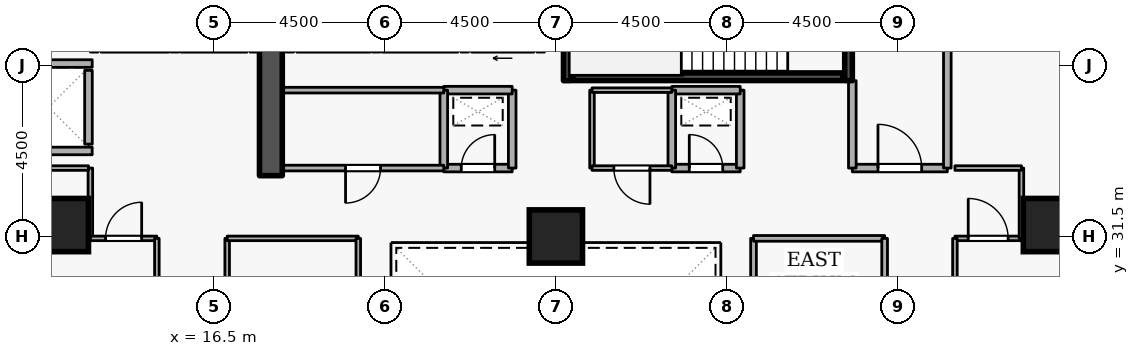
"""IFC4 building model, lengths in metres.
Left out: names, types, materials, properties, quantities, classifications, styles, units other than length and angle.
Written with IfcOpenShell. Run it as: python <this file> out.ifc"""

import sys

from ifc_helpers import new_model, si_unit, direction, frame, frame_2d, origin, origin_2d, place, context, subcontext, project, spatial, rectangle, extrude, element, fill, save


model = new_model("IFC4")
c1 = context("Model", 3, precision=1e-05, world=origin(), true_north=direction((0.0, 1.0)))
c2 = subcontext(c1, "Body", "Model", "MODEL_VIEW")
j1 = project(units=[si_unit("LENGTHUNIT", "METRE"), si_unit("PLANEANGLEUNIT", "RADIAN")], contexts=[c1])
p1 = place(None, origin())
s1 = spatial("IfcSite", under=j1, at=p1, CompositionType="ELEMENT")
p2 = place(p1, origin())
s2 = spatial("IfcBuilding", under=s1, at=p2, CompositionType="ELEMENT")
p3 = place(p2, frame((0.0, 0.0, 60.9)))
s3 = spatial("IfcBuildingStorey", under=s2, at=p3, CompositionType="ELEMENT", Elevation=60.9)
p4 = place(p3, frame((18.0, 33.1, 0.0), z_axis=(0.0, 0.0, 1.0), x_axis=(0.0, 1.0, 0.0)))
e1 = element("IfcWall", 1, at=p4, inside=s3, PredefinedType="SHEAR", context=c2, shape_type="SweptSolid", body=[
    extrude(rectangle(XDim=5.7, YDim=0.6, at=frame_2d((2.85, 0.0))), origin(), (0.0, 0.0, 1.0), 3.6),
])
for number, where, z_axis, x_axis in (
    (2, (12.5, 31.8, 0.0), (0.0, 0.0, 1.0), (1.0, 0.0, 0.0)),
    (3, (38.5, 31.8, 0.0), (0.0, 0.0, 1.0), (1.0, 0.0, 0.0)),
    (4, (25.5, 31.5, 0.0), (0.0, 0.0, 1.0), (1.0, 0.0, 0.0)),
):
    element("IfcColumn", number, at=place(p3, frame(where, z_axis=z_axis, x_axis=x_axis)), inside=s3, PredefinedType="COLUMN", context=c2, shape_type="SweptSolid", body=[
        extrude(rectangle(XDim=1.4, YDim=1.4, at=origin_2d()), origin(), (0.0, 0.0, 1.0), 3.6),
    ])
p5 = place(p3, frame((24.92, 36.45, 0.0), z_axis=(0.0, 0.0, 1.0), x_axis=(-1.0, 0.0, 0.0)))
e5 = element("IfcWall", 5, at=p5, inside=s3, PredefinedType="STANDARD", context=c2, shape_type="SweptSolid", body=[
    extrude(rectangle(XDim=1.64, YDim=0.2, at=frame_2d((0.82, 0.0))), origin(), (0.0, 0.0, 1.0), 3.34),
])
p6 = place(p5, frame((0.31, 0.0, 0.0)))
e6 = element("IfcOpeningElement", 6, at=p6, cuts=e5, PredefinedType="OPENING", context=c2, shape_type="SweptSolid", body=[
    extrude(rectangle(XDim=1.02, YDim=2.06, at=frame_2d((0.51, 1.03))), frame((0.0, 0.11, 0.0), z_axis=(0.0, -1.0, 0.0), x_axis=(1.0, 0.0, 0.0)), (0.0, 0.0, 1.0), 0.22),
])
p7 = place(p3, frame((22.92, 36.45, 0.0), z_axis=(0.0, 0.0, 1.0), x_axis=(-1.0, 0.0, 0.0)))
e7 = element("IfcWall", 7, at=p7, inside=s3, PredefinedType="STANDARD", context=c2, shape_type="SweptSolid", body=[
    extrude(rectangle(XDim=1.99, YDim=0.2, at=frame_2d((0.995, 0.0))), origin(), (0.0, 0.0, 1.0), 3.34),
])
p8 = place(p3, frame((20.62, 36.45, 0.0), z_axis=(0.0, 0.0, 1.0), x_axis=(-1.0, 0.0, 0.0)))
e8 = element("IfcWall", 8, at=p8, inside=s3, PredefinedType="STANDARD", context=c2, shape_type="SweptSolid", body=[
    extrude(rectangle(XDim=1.94, YDim=0.2, at=frame_2d((0.97, 0.0))), origin(), (0.0, 0.0, 1.0), 3.34),
])
p9 = place(p3, frame((17.37, 36.45, 0.0), z_axis=(0.0, 0.0, 1.0), x_axis=(-1.0, 0.0, 0.0)))
e9 = element("IfcWall", 9, at=p9, inside=s3, PredefinedType="STANDARD", context=c2, shape_type="SweptSolid", body=[
    extrude(rectangle(XDim=1.74, YDim=0.2, at=frame_2d((0.87, 0.0))), origin(), (0.0, 0.0, 1.0), 3.34),
])
p10 = place(p3, frame((15.32, 36.45, 0.0), z_axis=(0.0, 0.0, 1.0), x_axis=(-1.0, 0.0, 0.0)))
e10 = element("IfcWall", 10, at=p10, inside=s3, PredefinedType="STANDARD", context=c2, shape_type="SweptSolid", body=[
    extrude(rectangle(XDim=1.79, YDim=0.2, at=frame_2d((0.895, 0.0))), origin(), (0.0, 0.0, 1.0), 3.34),
])
p11 = place(p3, frame((13.2, 33.93, 0.0), z_axis=(0.0, 0.0, 1.0), x_axis=(0.0, 1.0, 0.0)))
e11 = element("IfcWall", 11, at=p11, inside=s3, PredefinedType="STANDARD", context=c2, shape_type="SweptSolid", body=[
    extrude(rectangle(XDim=1.94, YDim=0.2, at=frame_2d((0.97, 0.0))), origin(), (0.0, 0.0, 1.0), 3.34),
])
for number, where, z_axis, x_axis in (
    (12, (11.002, 36.05, 0.0), (0.0, 0.0, 1.0), (1.0, 0.0, 0.0)),
    (13, (11.002, 33.75, 0.0), (0.0, 0.0, 1.0), (1.0, 0.0, 0.0)),
):
    element("IfcWall", number, at=place(p3, frame(where, z_axis=z_axis, x_axis=x_axis)), inside=s3, PredefinedType="STANDARD", context=c2, shape_type="SweptSolid", body=[
        extrude(rectangle(XDim=2.296, YDim=0.2, at=frame_2d((1.148, 0.0))), origin(), (0.0, 0.0, 1.0), 3.34),
    ])
p12 = place(p3, frame((33.2, 38.95, 0.0), z_axis=(0.0, 0.0, 1.0), x_axis=(0.0, -1.0, 0.0)))
e14 = element("IfcWall", 14, at=p12, inside=s3, PredefinedType="SHEAR", context=c2, shape_type="SweptSolid", body=[
    extrude(rectangle(XDim=3.35, YDim=0.2, at=frame_2d((1.675, 0.0))), origin(), (0.0, 0.0, 1.0), 3.6),
])
p13 = place(p12, frame((1.125, 0.0, 0.0)))
e15 = element("IfcOpeningElement", 15, at=p13, cuts=e14, PredefinedType="OPENING", context=c2, shape_type="SweptSolid", body=[
    extrude(rectangle(XDim=1.1, YDim=2.1, at=frame_2d((0.55, 1.05))), frame((0.0, 0.11, 0.0), z_axis=(0.0, -1.0, 0.0), x_axis=(1.0, 0.0, 0.0)), (0.0, 0.0, 1.0), 0.22),
])
p14 = place(p3, frame((25.8, 35.6, 0.0), z_axis=(0.0, 0.0, 1.0), x_axis=(0.0, 1.0, 0.0)))
e16 = element("IfcWall", 16, at=p14, inside=s3, PredefinedType="SHEAR", context=c2, shape_type="SweptSolid", body=[
    extrude(rectangle(XDim=3.35, YDim=0.2, at=frame_2d((1.675, 0.0))), origin(), (0.0, 0.0, 1.0), 3.6),
])
p15 = place(p3, frame((25.95, 35.703, 0.0), z_axis=(0.0, 0.0, 1.0), x_axis=(1.0, 0.0, 0.0)))
e17 = element("IfcWall", 17, at=p15, inside=s3, PredefinedType="SHEAR", context=c2, shape_type="SweptSolid", body=[
    extrude(rectangle(XDim=7.1, YDim=0.2, at=frame_2d((3.55, 0.0))), origin(), (0.0, 0.0, 1.0), 3.6),
])
p16 = place(p3, frame((33.3, 33.3, 0.0), z_axis=(0.0, 0.0, 1.0), x_axis=(1.0, 0.0, 0.0)))
e18 = element("IfcWall", 18, at=p16, inside=s3, PredefinedType="STANDARD", context=c2, shape_type="SweptSolid", body=[
    extrude(rectangle(XDim=2.5, YDim=0.2, at=frame_2d((1.25, 0.0))), origin(), (0.0, 0.0, 1.0), 3.34),
])
p17 = place(p16, frame((0.675, 0.0, 0.0)))
e19 = element("IfcOpeningElement", 19, at=p17, cuts=e18, PredefinedType="OPENING", context=c2, shape_type="SweptSolid", body=[
    extrude(rectangle(XDim=1.15, YDim=2.1, at=frame_2d((0.575, 1.05))), frame((0.0, 0.11, 0.0), z_axis=(0.0, -1.0, 0.0), x_axis=(1.0, 0.0, 0.0)), (0.0, 0.0, 1.0), 0.22),
])
p18 = place(p3, frame((35.8, 33.3, 0.0), z_axis=(0.0, 0.0, 1.0), x_axis=(0.0, 1.0, 0.0)))
e20 = element("IfcWall", 20, at=p18, inside=s3, PredefinedType="STANDARD", context=c2, shape_type="SweptSolid", body=[
    extrude(rectangle(XDim=5.7, YDim=0.2, at=frame_2d((2.85, 0.0))), origin(), (0.0, 0.0, 1.0), 3.34),
])
p19 = place(p3, frame((33.3, 35.6, 0.0), z_axis=(0.0, 0.0, 1.0), x_axis=(0.0, -1.0, 0.0)))
e21 = element("IfcWall", 21, at=p19, inside=s3, PredefinedType="STANDARD", context=c2, shape_type="SweptSolid", body=[
    extrude(rectangle(XDim=2.3, YDim=0.2, at=frame_2d((1.15, 0.0))), origin(), (0.0, 0.0, 1.0), 2.545),
])
p20 = place(p3, frame((22.55, 33.3, 0.0), z_axis=(0.0, 0.0, 1.0), x_axis=(1.0, 0.0, 0.0)))
e22 = element("IfcWall", 22, at=p20, inside=s3, PredefinedType="STANDARD", context=c2, shape_type="SweptSolid", body=[
    extrude(rectangle(XDim=1.8, YDim=0.2, at=frame_2d((0.9, 0.0))), origin(), (0.0, 0.0, 1.0), 3.34),
])
p21 = place(p20, frame((0.46, 0.0, 0.0)))
e23 = element("IfcOpeningElement", 23, at=p21, cuts=e22, PredefinedType="OPENING", context=c2, shape_type="SweptSolid", body=[
    extrude(rectangle(XDim=0.88, YDim=2.04, at=frame_2d((0.44, 1.02))), frame((0.0, 0.11, 0.0), z_axis=(0.0, -1.0, 0.0), x_axis=(1.0, 0.0, 0.0)), (0.0, 0.0, 1.0), 0.22),
])
p22 = place(p3, frame((24.35, 33.3, 0.0), z_axis=(0.0, 0.0, 1.0), x_axis=(0.0, 1.0, 0.0)))
e24 = element("IfcWall", 24, at=p22, inside=s3, PredefinedType="STANDARD", context=c2, shape_type="SweptSolid", body=[
    extrude(rectangle(XDim=2.05, YDim=0.2, at=frame_2d((1.025, 0.0))), origin(), (0.0, 0.0, 1.0), 3.34),
])
p23 = place(p3, frame((24.35, 35.35, 0.0), z_axis=(0.0, 0.0, 1.0), x_axis=(-1.0, 0.0, 0.0)))
e25 = element("IfcWall", 25, at=p23, inside=s3, PredefinedType="STANDARD", context=c2, shape_type="SweptSolid", body=[
    extrude(rectangle(XDim=1.8, YDim=0.2, at=frame_2d((0.9, 0.0))), origin(), (0.0, 0.0, 1.0), 3.34),
])
p24 = place(p3, frame((22.55, 35.35, 0.0), z_axis=(0.0, 0.0, 1.0), x_axis=(0.0, -1.0, 0.0)))
e26 = element("IfcWall", 26, at=p24, inside=s3, PredefinedType="STANDARD", context=c2, shape_type="SweptSolid", body=[
    extrude(rectangle(XDim=2.05, YDim=0.2, at=frame_2d((1.025, 0.0))), origin(), (0.0, 0.0, 1.0), 3.34),
])
p25 = place(p3, frame((28.55, 33.3, 0.0), z_axis=(0.0, 0.0, 1.0), x_axis=(1.0, 0.0, 0.0)))
e27 = element("IfcWall", 27, at=p25, inside=s3, PredefinedType="STANDARD", context=c2, shape_type="SweptSolid", body=[
    extrude(rectangle(XDim=1.8, YDim=0.2, at=frame_2d((0.9, 0.0))), origin(), (0.0, 0.0, 1.0), 3.34),
])
p26 = place(p25, frame((0.46, 0.0, 0.0)))
e28 = element("IfcOpeningElement", 28, at=p26, cuts=e27, PredefinedType="OPENING", context=c2, shape_type="SweptSolid", body=[
    extrude(rectangle(XDim=0.88, YDim=2.04, at=frame_2d((0.44, 1.02))), frame((0.0, 0.11, 0.0), z_axis=(0.0, -1.0, 0.0), x_axis=(1.0, 0.0, 0.0)), (0.0, 0.0, 1.0), 0.22),
])
p27 = place(p3, frame((30.35, 33.3, 0.0), z_axis=(0.0, 0.0, 1.0), x_axis=(0.0, 1.0, 0.0)))
e29 = element("IfcWall", 29, at=p27, inside=s3, PredefinedType="STANDARD", context=c2, shape_type="SweptSolid", body=[
    extrude(rectangle(XDim=2.05, YDim=0.2, at=frame_2d((1.025, 0.0))), origin(), (0.0, 0.0, 1.0), 3.34),
])
p28 = place(p3, frame((30.35, 35.35, 0.0), z_axis=(0.0, 0.0, 1.0), x_axis=(-1.0, 0.0, 0.0)))
e30 = element("IfcWall", 30, at=p28, inside=s3, PredefinedType="STANDARD", context=c2, shape_type="SweptSolid", body=[
    extrude(rectangle(XDim=1.8, YDim=0.2, at=frame_2d((0.9, 0.0))), origin(), (0.0, 0.0, 1.0), 3.34),
])
p29 = place(p3, frame((28.55, 35.35, 0.0), z_axis=(0.0, 0.0, 1.0), x_axis=(0.0, -1.0, 0.0)))
e31 = element("IfcWall", 31, at=p29, inside=s3, PredefinedType="STANDARD", context=c2, shape_type="SweptSolid", body=[
    extrude(rectangle(XDim=2.05, YDim=0.2, at=frame_2d((1.025, 0.0))), origin(), (0.0, 0.0, 1.0), 3.34),
])
p30 = place(p3, frame((18.3, 35.35, 0.0), z_axis=(0.0, 0.0, 1.0), x_axis=(1.0, 0.0, 0.0)))
e32 = element("IfcWall", 32, at=p30, inside=s3, PredefinedType="PARTITIONING", context=c2, shape_type="SweptSolid", body=[
    extrude(rectangle(XDim=4.25, YDim=0.15, at=frame_2d((2.125, 0.0))), origin(), (0.0, 0.0, 1.0), 3.34),
])
p31 = place(p3, frame((22.55, 33.3, 0.0), z_axis=(0.0, 0.0, 1.0), x_axis=(-1.0, 0.0, 0.0)))
e33 = element("IfcWall", 33, at=p31, inside=s3, PredefinedType="PARTITIONING", context=c2, shape_type="SweptSolid", body=[
    extrude(rectangle(XDim=4.25, YDim=0.15, at=frame_2d((2.125, 0.0))), origin(), (0.0, 0.0, 1.0), 3.34),
])
p32 = place(p31, frame((1.665, 0.0, 0.0)))
e34 = element("IfcOpeningElement", 34, at=p32, cuts=e33, PredefinedType="OPENING", context=c2, shape_type="SweptSolid", body=[
    extrude(rectangle(XDim=0.92, YDim=2.08, at=frame_2d((0.46, 1.04))), frame((0.0, 0.085, 0.0), z_axis=(0.0, -1.0, 0.0), x_axis=(1.0, 0.0, 0.0)), (0.0, 0.0, 1.0), 0.17),
])
p33 = place(p3, frame((26.45, 33.3, 0.0), z_axis=(0.0, 0.0, 1.0), x_axis=(0.0, 1.0, 0.0)))
e35 = element("IfcWall", 35, at=p33, inside=s3, PredefinedType="PARTITIONING", context=c2, shape_type="SweptSolid", body=[
    extrude(rectangle(XDim=2.05, YDim=0.12, at=frame_2d((1.025, 0.0))), origin(), (0.0, 0.0, 1.0), 3.34),
])
p34 = place(p3, frame((26.45, 35.35, 0.0), z_axis=(0.0, 0.0, 1.0), x_axis=(1.0, 0.0, 0.0)))
e36 = element("IfcWall", 36, at=p34, inside=s3, PredefinedType="PARTITIONING", context=c2, shape_type="SweptSolid", body=[
    extrude(rectangle(XDim=2.1, YDim=0.12, at=frame_2d((1.05, 0.0))), origin(), (0.0, 0.0, 1.0), 3.34),
])
p35 = place(p3, frame((28.55, 33.3, 0.0), z_axis=(0.0, 0.0, 1.0), x_axis=(-1.0, 0.0, 0.0)))
e37 = element("IfcWall", 37, at=p35, inside=s3, PredefinedType="PARTITIONING", context=c2, shape_type="SweptSolid", body=[
    extrude(rectangle(XDim=2.1, YDim=0.12, at=frame_2d((1.05, 0.0))), origin(), (0.0, 0.0, 1.0), 3.34),
])
p36 = place(p35, frame((0.575, 0.0, 0.0)))
e38 = element("IfcOpeningElement", 38, at=p36, cuts=e37, PredefinedType="OPENING", context=c2, shape_type="SweptSolid", body=[
    extrude(rectangle(XDim=0.95, YDim=2.1, at=frame_2d((0.475, 1.05))), frame((0.0, 0.07, 0.0), z_axis=(0.0, -1.0, 0.0), x_axis=(1.0, 0.0, 0.0)), (0.0, 0.0, 1.0), 0.14),
])
p37 = place(p3, frame((13.25, 33.3, 0.0), z_axis=(0.0, 0.0, 1.0), x_axis=(0.0, -1.0, 0.0)))
e39 = element("IfcWall", 39, at=p37, inside=s3, PredefinedType="PARTITIONING", context=c2, shape_type="SweptSolid", body=[
    extrude(rectangle(XDim=1.85, YDim=0.12, at=frame_2d((0.925, 0.0))), origin(), (0.0, 0.0, 1.0), 3.34),
])
p38 = place(p3, frame((13.25, 31.45, 0.0), z_axis=(0.0, 0.0, 1.0), x_axis=(1.0, 0.0, 0.0)))
e40 = element("IfcWall", 40, at=p38, inside=s3, PredefinedType="PARTITIONING", context=c2, shape_type="SweptSolid", body=[
    extrude(rectangle(XDim=1.75, YDim=0.12, at=frame_2d((0.875, 0.0))), origin(), (0.0, 0.0, 1.0), 3.34),
])
p39 = place(p38, frame((0.4, 0.0, 0.0)))
e41 = element("IfcOpeningElement", 41, at=p39, cuts=e40, PredefinedType="OPENING", context=c2, shape_type="SweptSolid", body=[
    extrude(rectangle(XDim=0.95, YDim=2.1, at=frame_2d((0.475, 1.05))), frame((0.0, 0.07, 0.0), z_axis=(0.0, -1.0, 0.0), x_axis=(1.0, 0.0, 0.0)), (0.0, 0.0, 1.0), 0.14),
])
p40 = place(p3, frame((15.0, 31.45, 0.0), z_axis=(0.0, 0.0, 1.0), x_axis=(0.0, -1.0, 0.0)))
e42 = element("IfcWall", 42, at=p40, inside=s3, PredefinedType="PARTITIONING", context=c2, shape_type="SweptSolid", body=[
    extrude(rectangle(XDim=1.3, YDim=0.12, at=frame_2d((0.65, 0.0))), origin(), (0.0, 0.0, 1.0), 3.34),
])
p41 = place(p3, frame((10.9, 33.3, 0.0), z_axis=(0.0, 0.0, 1.0), x_axis=(1.0, 0.0, 0.0)))
e43 = element("IfcWall", 43, at=p41, inside=s3, PredefinedType="PARTITIONING", context=c2, shape_type="SweptSolid", body=[
    extrude(rectangle(XDim=2.3, YDim=0.12, at=frame_2d((1.15, 0.0))), origin(), (0.0, 0.0, 1.0), 3.34),
])
p42 = place(p3, frame((36.0, 31.45, 0.0), z_axis=(0.0, 0.0, 1.0), x_axis=(1.0, 0.0, 0.0)))
e44 = element("IfcWall", 44, at=p42, inside=s3, PredefinedType="PARTITIONING", context=c2, shape_type="SweptSolid", body=[
    extrude(rectangle(XDim=1.75, YDim=0.12, at=frame_2d((0.875, 0.0))), origin(), (0.0, 0.0, 1.0), 3.34),
])
p43 = place(p42, frame((0.35, 0.0, 0.0)))
e45 = element("IfcOpeningElement", 45, at=p43, cuts=e44, PredefinedType="OPENING", context=c2, shape_type="SweptSolid", body=[
    extrude(rectangle(XDim=1.05, YDim=2.1, at=frame_2d((0.525, 1.05))), frame((0.0, 0.07, 0.0), z_axis=(0.0, -1.0, 0.0), x_axis=(1.0, 0.0, 0.0)), (0.0, 0.0, 1.0), 0.14),
])
p44 = place(p3, frame((37.75, 31.45, 0.0), z_axis=(0.0, 0.0, 1.0), x_axis=(0.0, 1.0, 0.0)))
e46 = element("IfcWall", 46, at=p44, inside=s3, PredefinedType="PARTITIONING", context=c2, shape_type="SweptSolid", body=[
    extrude(rectangle(XDim=1.85, YDim=0.12, at=frame_2d((0.925, 0.0))), origin(), (0.0, 0.0, 1.0), 3.34),
])
p45 = place(p3, frame((37.75, 33.3, 0.0), z_axis=(0.0, 0.0, 1.0), x_axis=(-1.0, 0.0, 0.0)))
e47 = element("IfcWall", 47, at=p45, inside=s3, PredefinedType="PARTITIONING", context=c2, shape_type="SweptSolid", body=[
    extrude(rectangle(XDim=1.75, YDim=0.12, at=frame_2d((0.875, 0.0))), origin(), (0.0, 0.0, 1.0), 3.34),
])
p46 = place(p3, frame((36.0, 30.15, 0.0), z_axis=(0.0, 0.0, 1.0), x_axis=(0.0, 1.0, 0.0)))
e48 = element("IfcWall", 48, at=p46, inside=s3, PredefinedType="PARTITIONING", context=c2, shape_type="SweptSolid", body=[
    extrude(rectangle(XDim=1.3, YDim=0.12, at=frame_2d((0.65, 0.0))), origin(), (0.0, 0.0, 1.0), 3.34),
])
p47 = place(p3, frame((30.7, 22.55, 0.0), z_axis=(0.0, 0.0, 1.0), x_axis=(0.0, 1.0, 0.0)))
e49 = element("IfcWall", 49, at=p47, inside=s3, PredefinedType="PARTITIONING", context=c2, shape_type="SweptSolid", body=[
    extrude(rectangle(XDim=8.9, YDim=0.15, at=frame_2d((4.45, 0.0))), origin(), (0.0, 0.0, 1.0), 3.34),
])
p48 = place(p3, frame((30.7, 31.45, 0.0), z_axis=(0.0, 0.0, 1.0), x_axis=(1.0, 0.0, 0.0)))
e50 = element("IfcWall", 50, at=p48, inside=s3, PredefinedType="PARTITIONING", context=c2, shape_type="SweptSolid", body=[
    extrude(rectangle(XDim=3.45, YDim=0.15, at=frame_2d((1.725, 0.0))), origin(), (0.0, 0.0, 1.0), 3.34),
])
p49 = place(p3, frame((34.15, 31.45, 0.0), z_axis=(0.0, 0.0, 1.0), x_axis=(0.0, -1.0, 0.0)))
e51 = element("IfcWall", 51, at=p49, inside=s3, PredefinedType="PARTITIONING", context=c2, shape_type="SweptSolid", body=[
    extrude(rectangle(XDim=8.9, YDim=0.15, at=frame_2d((4.45, 0.0))), origin(), (0.0, 0.0, 1.0), 3.34),
])
p50 = place(p49, frame((3.8, 0.0, 0.0)))
e52 = element("IfcOpeningElement", 52, at=p50, cuts=e51, PredefinedType="OPENING", context=c2, shape_type="SweptSolid", body=[
    extrude(rectangle(XDim=1.3, YDim=2.12, at=frame_2d((0.65, 1.06))), frame((0.0, 0.085, 0.0), z_axis=(0.0, -1.0, 0.0), x_axis=(1.0, 0.0, 0.0)), (0.0, 0.0, 1.0), 0.17),
])
p51 = place(p3, frame((16.85, 22.55, 0.0), z_axis=(0.0, 0.0, 1.0), x_axis=(0.0, 1.0, 0.0)))
e53 = element("IfcWall", 53, at=p51, inside=s3, PredefinedType="PARTITIONING", context=c2, shape_type="SweptSolid", body=[
    extrude(rectangle(XDim=8.9, YDim=0.12, at=frame_2d((4.45, 0.0))), origin(), (0.0, 0.0, 1.0), 3.34),
])
p52 = place(p51, frame((3.975, 0.0, 0.0)))
e54 = element("IfcOpeningElement", 54, at=p52, cuts=e53, PredefinedType="OPENING", context=c2, shape_type="SweptSolid", body=[
    extrude(rectangle(XDim=0.95, YDim=2.1, at=frame_2d((0.475, 1.05))), frame((0.0, 0.07, 0.0), z_axis=(0.0, -1.0, 0.0), x_axis=(1.0, 0.0, 0.0)), (0.0, 0.0, 1.0), 0.14),
])
p53 = place(p3, frame((16.85, 31.45, 0.0), z_axis=(0.0, 0.0, 1.0), x_axis=(1.0, 0.0, 0.0)))
e55 = element("IfcWall", 55, at=p53, inside=s3, PredefinedType="PARTITIONING", context=c2, shape_type="SweptSolid", body=[
    extrude(rectangle(XDim=3.45, YDim=0.12, at=frame_2d((1.725, 0.0))), origin(), (0.0, 0.0, 1.0), 3.34),
])
p54 = place(p3, frame((20.3, 31.45, 0.0), z_axis=(0.0, 0.0, 1.0), x_axis=(0.0, -1.0, 0.0)))
e56 = element("IfcWall", 56, at=p54, inside=s3, PredefinedType="PARTITIONING", context=c2, shape_type="SweptSolid", body=[
    extrude(rectangle(XDim=8.9, YDim=0.12, at=frame_2d((4.45, 0.0))), origin(), (0.0, 0.0, 1.0), 3.34),
])
p55 = place(p17, origin())
e57 = element("IfcDoor", 57, at=p55, inside=s3, OperationType="SINGLE_SWING_LEFT", PredefinedType="DOOR", context=c2, shape_type="SweptSolid", body=[
    extrude(rectangle(XDim=1.15, YDim=2.1, at=frame_2d((0.575, 1.05))), frame((0.0, 0.025, 0.0), z_axis=(0.0, -1.0, 0.0), x_axis=(1.0, 0.0, 0.0)), (0.0, 0.0, 1.0), 0.05),
])
fill(e19, e57)
p56 = place(p21, origin())
e58 = element("IfcDoor", 58, at=p56, inside=s3, OperationType="SINGLE_SWING_RIGHT", PredefinedType="DOOR", context=c2, shape_type="SweptSolid", body=[
    extrude(rectangle(XDim=0.88, YDim=2.04, at=frame_2d((0.44, 1.02))), frame((0.0, 0.025, 0.0), z_axis=(0.0, -1.0, 0.0), x_axis=(1.0, 0.0, 0.0)), (0.0, 0.0, 1.0), 0.05),
])
fill(e23, e58)
p57 = place(p26, origin())
e59 = element("IfcDoor", 59, at=p57, inside=s3, OperationType="SINGLE_SWING_LEFT", PredefinedType="DOOR", context=c2, shape_type="SweptSolid", body=[
    extrude(rectangle(XDim=0.88, YDim=2.04, at=frame_2d((0.44, 1.02))), frame((0.0, 0.025, 0.0), z_axis=(0.0, -1.0, 0.0), x_axis=(1.0, 0.0, 0.0)), (0.0, 0.0, 1.0), 0.05),
])
fill(e28, e59)
p58 = place(p32, origin())
e60 = element("IfcDoor", 60, at=p58, inside=s3, OperationType="SINGLE_SWING_RIGHT", PredefinedType="DOOR", context=c2, shape_type="SweptSolid", body=[
    extrude(rectangle(XDim=0.92, YDim=2.08, at=frame_2d((0.46, 1.04))), frame((0.0, 0.025, 0.0), z_axis=(0.0, -1.0, 0.0), x_axis=(1.0, 0.0, 0.0)), (0.0, 0.0, 1.0), 0.05),
])
fill(e34, e60)
p59 = place(p36, origin())
e61 = element("IfcDoor", 61, at=p59, inside=s3, OperationType="SINGLE_SWING_LEFT", PredefinedType="DOOR", context=c2, shape_type="SweptSolid", body=[
    extrude(rectangle(XDim=0.95, YDim=2.1, at=frame_2d((0.475, 1.05))), frame((0.0, 0.025, 0.0), z_axis=(0.0, -1.0, 0.0), x_axis=(1.0, 0.0, 0.0)), (0.0, 0.0, 1.0), 0.05),
])
fill(e38, e61)
p60 = place(p39, origin())
e62 = element("IfcDoor", 62, at=p60, inside=s3, OperationType="SINGLE_SWING_RIGHT", PredefinedType="DOOR", context=c2, shape_type="SweptSolid", body=[
    extrude(rectangle(XDim=0.95, YDim=2.1, at=frame_2d((0.475, 1.05))), frame((0.0, 0.025, 0.0), z_axis=(0.0, -1.0, 0.0), x_axis=(1.0, 0.0, 0.0)), (0.0, 0.0, 1.0), 0.05),
])
fill(e41, e62)
p61 = place(p43, origin())
e63 = element("IfcDoor", 63, at=p61, inside=s3, OperationType="SINGLE_SWING_LEFT", PredefinedType="DOOR", context=c2, shape_type="SweptSolid", body=[
    extrude(rectangle(XDim=1.05, YDim=2.1, at=frame_2d((0.525, 1.05))), frame((0.0, 0.025, 0.0), z_axis=(0.0, -1.0, 0.0), x_axis=(1.0, 0.0, 0.0)), (0.0, 0.0, 1.0), 0.05),
])
fill(e45, e63)
save(model, sys.argv[1])
